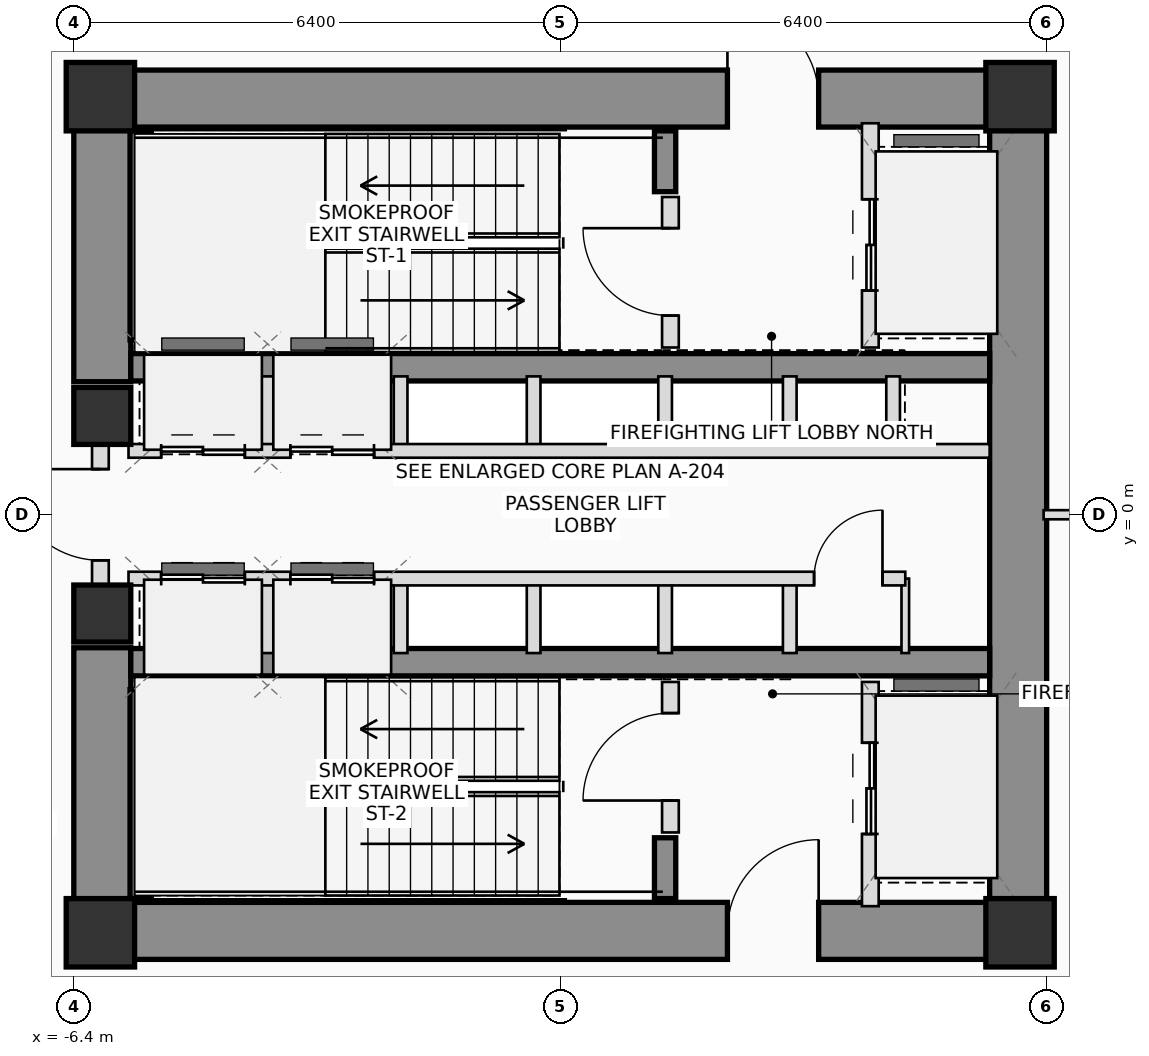
"""IFC4 building model, lengths in metres.
Left out: names, types, materials, properties, quantities, classifications, styles, units other than length and angle.
Written with IfcOpenShell. Run it as: python <this file> out.ifc"""

import sys

from ifc_helpers import new_model, si_unit, direction, frame, frame_2d, origin, origin_2d, place, context, subcontext, project, spatial, rectangle, extrude, source, transform, mapped, element, fill, save


model = new_model("IFC4")
c1 = context("Model", 3, precision=1e-05, world=origin(), true_north=direction((0.0, 1.0)))
c2 = subcontext(c1, "Body", "Model", "MODEL_VIEW")
j1 = project(units=[si_unit("LENGTHUNIT", "METRE"), si_unit("PLANEANGLEUNIT", "RADIAN")], contexts=[c1])
p1 = place(None, origin())
s1 = spatial("IfcSite", under=j1, at=p1, CompositionType="ELEMENT")
p2 = place(p1, origin())
s2 = spatial("IfcBuilding", under=s1, at=p2, CompositionType="ELEMENT")
p3 = place(p2, frame((0.0, 0.0, 27.5)))
s3 = spatial("IfcBuildingStorey", under=s2, at=p3, CompositionType="ELEMENT", Elevation=27.5)
m1 = source(origin(), c2, "Body", "SweptSolid", [
    extrude(rectangle(XDim=0.9, YDim=0.9, at=origin_2d()), origin(), (0.0, 0.0, 1.0), 3.7),
])
for number, where, z_axis, x_axis in (
    (1, (-6.05, -5.5, 0.0), (0.0, 0.0, 1.0), (1.0, 0.0, 0.0)),
    (2, (6.05, -5.5, 0.0), (0.0, 0.0, 1.0), (1.0, 0.0, 0.0)),
    (3, (6.05, 5.5, 0.0), (0.0, 0.0, 1.0), (1.0, 0.0, 0.0)),
    (4, (-6.05, 5.5, 0.0), (0.0, 0.0, 1.0), (1.0, 0.0, 0.0)),
):
    element("IfcColumn", number, at=place(p3, frame(where, z_axis=z_axis, x_axis=x_axis)), inside=s3, PredefinedType="COLUMN", context=c2, shape_type="MappedRepresentation", body=[
        mapped(m1, transform((0.0, 0.0, 0.0), scale=1.0)),
    ])
p4 = place(p3, frame((-6.4, 5.475, 0.0), z_axis=(0.0, 0.0, 1.0), x_axis=(1.0, 0.0, 0.0)))
e5 = element("IfcWall", 5, at=p4, inside=s3, PredefinedType="SHEAR", context=c2, shape_type="SweptSolid", body=[
    extrude(rectangle(XDim=12.8, YDim=0.75, at=frame_2d((6.4, 0.0))), origin(), (0.0, 0.0, 1.0), 3.7),
])
p5 = place(p4, frame((8.6, 0.0, 0.0)))
e6 = element("IfcOpeningElement", 6, at=p5, cuts=e5, PredefinedType="OPENING", context=c2, shape_type="SweptSolid", body=[
    extrude(rectangle(XDim=1.2, YDim=2.2, at=frame_2d((0.6, 1.1))), frame((0.0, 0.385, 0.0), z_axis=(0.0, -1.0, 0.0), x_axis=(1.0, 0.0, 0.0)), (0.0, 0.0, 1.0), 0.77),
])
p6 = place(p3, frame((-6.4, -5.475, 0.0), z_axis=(0.0, 0.0, 1.0), x_axis=(1.0, 0.0, 0.0)))
e7 = element("IfcWall", 7, at=p6, inside=s3, PredefinedType="SHEAR", context=c2, shape_type="SweptSolid", body=[
    extrude(rectangle(XDim=12.8, YDim=0.75, at=frame_2d((6.4, 0.0))), origin(), (0.0, 0.0, 1.0), 3.7),
])
p7 = place(p6, frame((8.6, 0.0, 0.0)))
e8 = element("IfcOpeningElement", 8, at=p7, cuts=e7, PredefinedType="OPENING", context=c2, shape_type="SweptSolid", body=[
    extrude(rectangle(XDim=1.2, YDim=2.2, at=frame_2d((0.6, 1.1))), frame((0.0, 0.385, 0.0), z_axis=(0.0, -1.0, 0.0), x_axis=(1.0, 0.0, 0.0)), (0.0, 0.0, 1.0), 0.77),
])
p8 = place(p3, frame((6.025, -5.1, 0.0), z_axis=(0.0, 0.0, 1.0), x_axis=(0.0, 1.0, 0.0)))
e9 = element("IfcWall", 9, at=p8, inside=s3, PredefinedType="SHEAR", context=c2, shape_type="SweptSolid", body=[
    extrude(rectangle(XDim=10.2, YDim=0.75, at=frame_2d((5.1, 0.0))), origin(), (0.0, 0.0, 1.0), 3.7),
])
for number, where, z_axis, x_axis in (
    (10, (-6.025, -5.1, 0.0), (0.0, 0.0, 1.0), (0.0, 1.0, 0.0)),
    (11, (-6.025, 1.75, 0.0), (0.0, 0.0, 1.0), (0.0, 1.0, 0.0)),
):
    element("IfcWall", number, at=place(p3, frame(where, z_axis=z_axis, x_axis=x_axis)), inside=s3, PredefinedType="SHEAR", context=c2, shape_type="SweptSolid", body=[
        extrude(rectangle(XDim=3.35, YDim=0.75, at=frame_2d((1.675, 0.0))), origin(), (0.0, 0.0, 1.0), 3.7),
    ])
for number, where, z_axis, x_axis in (
    (12, (-5.65, 1.94, 0.0), (0.0, 0.0, 1.0), (1.0, 0.0, 0.0)),
    (13, (-5.65, -1.94, 0.0), (0.0, 0.0, 1.0), (1.0, 0.0, 0.0)),
):
    element("IfcWall", number, at=place(p3, frame(where, z_axis=z_axis, x_axis=x_axis)), inside=s3, PredefinedType="SHEAR", context=c2, shape_type="SweptSolid", body=[
        extrude(rectangle(XDim=11.3, YDim=0.36, at=frame_2d((5.65, 0.0))), origin(), (0.0, 0.0, 1.0), 3.7),
    ])
p9 = place(p3, frame((-5.52, 2.3, 0.0), z_axis=(0.0, 0.0, 1.0), x_axis=(0.0, 1.0, 0.0)))
e14 = element("IfcWall", 14, at=p9, inside=s3, PredefinedType="SHEAR", context=c2, shape_type="SweptSolid", body=[
    extrude(rectangle(XDim=2.75, YDim=0.28, at=frame_2d((1.375, 0.0))), origin(), (0.0, 0.0, 1.0), 3.7),
])
p10 = place(p3, frame((1.38, 4.25, 0.0), z_axis=(0.0, 0.0, 1.0), x_axis=(0.0, 1.0, 0.0)))
e15 = element("IfcWall", 15, at=p10, inside=s3, PredefinedType="SHEAR", context=c2, shape_type="SweptSolid", body=[
    extrude(rectangle(XDim=0.8, YDim=0.28, at=frame_2d((0.4, 0.0))), origin(), (0.0, 0.0, 1.0), 3.7),
])
p11 = place(p3, frame((-5.52, -5.05, 0.0), z_axis=(0.0, 0.0, 1.0), x_axis=(0.0, 1.0, 0.0)))
e16 = element("IfcWall", 16, at=p11, inside=s3, PredefinedType="SHEAR", context=c2, shape_type="SweptSolid", body=[
    extrude(rectangle(XDim=2.75, YDim=0.28, at=frame_2d((1.375, 0.0))), origin(), (0.0, 0.0, 1.0), 3.7),
])
p12 = place(p3, frame((1.38, -5.05, 0.0), z_axis=(0.0, 0.0, 1.0), x_axis=(0.0, 1.0, 0.0)))
e17 = element("IfcWall", 17, at=p12, inside=s3, PredefinedType="SHEAR", context=c2, shape_type="SweptSolid", body=[
    extrude(rectangle(XDim=0.8, YDim=0.28, at=frame_2d((0.4, 0.0))), origin(), (0.0, 0.0, 1.0), 3.7),
])
m2 = source(origin(), c2, "Body", "SweptSolid", [
    extrude(rectangle(XDim=0.75, YDim=0.75, at=origin_2d()), origin(), (0.0, 0.0, 1.0), 3.7),
])
for number, where, z_axis, x_axis in (
    (18, (-6.025, -1.3, 0.0), (0.0, 0.0, 1.0), (1.0, 0.0, 0.0)),
    (19, (-6.025, 1.3, 0.0), (0.0, 0.0, 1.0), (1.0, 0.0, 0.0)),
):
    element("IfcColumn", number, at=place(p3, frame(where, z_axis=z_axis, x_axis=x_axis)), inside=s3, PredefinedType="COLUMN", context=c2, shape_type="MappedRepresentation", body=[
        mapped(m2, transform((0.0, 0.0, 0.0), scale=1.0)),
    ])
p13 = place(p3, frame((-6.05, -0.95, 0.0), z_axis=(0.0, 0.0, 1.0), x_axis=(0.0, 1.0, 0.0)))
e20 = element("IfcWall", 20, at=p13, inside=s3, PredefinedType="PLUMBINGWALL", context=c2, shape_type="SweptSolid", body=[
    extrude(rectangle(XDim=1.9, YDim=0.22, at=frame_2d((0.95, 0.0))), origin(), (0.0, 0.0, 1.0), 2.475),
])
p14 = place(p13, frame((0.35, 0.0, 0.0)))
e21 = element("IfcOpeningElement", 21, at=p14, cuts=e20, PredefinedType="OPENING", context=c2, shape_type="SweptSolid", body=[
    extrude(rectangle(XDim=1.2, YDim=2.2, at=frame_2d((0.6, 1.1))), frame((0.0, 0.12, 0.0), z_axis=(0.0, -1.0, 0.0), x_axis=(1.0, 0.0, 0.0)), (0.0, 0.0, 1.0), 0.24),
])
p15 = place(p3, frame((1.45, 2.2, 0.0), z_axis=(0.0, 0.0, 1.0), x_axis=(0.0, 1.0, 0.0)))
e22 = element("IfcWall", 22, at=p15, inside=s3, PredefinedType="PLUMBINGWALL", context=c2, shape_type="SweptSolid", body=[
    extrude(rectangle(XDim=1.98, YDim=0.22, at=frame_2d((0.99, 0.0))), origin(), (0.0, 0.0, 1.0), 3.495),
])
p16 = place(p15, frame((0.42, 0.0, 0.0)))
e23 = element("IfcOpeningElement", 23, at=p16, cuts=e22, PredefinedType="OPENING", context=c2, shape_type="SweptSolid", body=[
    extrude(rectangle(XDim=1.15, YDim=2.15, at=frame_2d((0.575, 1.075))), frame((0.0, 0.12, 0.0), z_axis=(0.0, -1.0, 0.0), x_axis=(1.0, 0.0, 0.0)), (0.0, 0.0, 1.0), 0.24),
])
p17 = place(p3, frame((4.08, 2.2, 0.0), z_axis=(0.0, 0.0, 1.0), x_axis=(0.0, 1.0, 0.0)))
e24 = element("IfcWall", 24, at=p17, inside=s3, PredefinedType="PLUMBINGWALL", context=c2, shape_type="SweptSolid", body=[
    extrude(rectangle(XDim=2.95, YDim=0.22, at=frame_2d((1.475, 0.0))), origin(), (0.0, 0.0, 1.0), 3.495),
])
p18 = place(p17, frame((0.75, 0.0, 0.0)))
e25 = element("IfcOpeningElement", 25, at=p18, cuts=e24, PredefinedType="OPENING", context=c2, shape_type="SweptSolid", body=[
    extrude(rectangle(XDim=1.2, YDim=2.25, at=frame_2d((0.6, 1.125))), frame((0.0, 0.12, 0.0), z_axis=(0.0, -1.0, 0.0), x_axis=(1.0, 0.0, 0.0)), (0.0, 0.0, 1.0), 0.24),
])
p19 = place(p3, frame((1.45, -4.18, 0.0), z_axis=(0.0, 0.0, 1.0), x_axis=(0.0, 1.0, 0.0)))
e26 = element("IfcWall", 26, at=p19, inside=s3, PredefinedType="PLUMBINGWALL", context=c2, shape_type="SweptSolid", body=[
    extrude(rectangle(XDim=1.98, YDim=0.22, at=frame_2d((0.99, 0.0))), origin(), (0.0, 0.0, 1.0), 3.495),
])
p20 = place(p19, frame((0.42, 0.0, 0.0)))
e27 = element("IfcOpeningElement", 27, at=p20, cuts=e26, PredefinedType="OPENING", context=c2, shape_type="SweptSolid", body=[
    extrude(rectangle(XDim=1.15, YDim=2.15, at=frame_2d((0.575, 1.075))), frame((0.0, 0.12, 0.0), z_axis=(0.0, -1.0, 0.0), x_axis=(1.0, 0.0, 0.0)), (0.0, 0.0, 1.0), 0.24),
])
p21 = place(p3, frame((4.08, -5.15, 0.0), z_axis=(0.0, 0.0, 1.0), x_axis=(0.0, 1.0, 0.0)))
e28 = element("IfcWall", 28, at=p21, inside=s3, PredefinedType="PLUMBINGWALL", context=c2, shape_type="SweptSolid", body=[
    extrude(rectangle(XDim=2.95, YDim=0.22, at=frame_2d((1.475, 0.0))), origin(), (0.0, 0.0, 1.0), 3.495),
])
p22 = place(p21, frame((0.95, 0.0, 0.0)))
e29 = element("IfcOpeningElement", 29, at=p22, cuts=e28, PredefinedType="OPENING", context=c2, shape_type="SweptSolid", body=[
    extrude(rectangle(XDim=1.2, YDim=2.25, at=frame_2d((0.6, 1.125))), frame((0.0, 0.12, 0.0), z_axis=(0.0, -1.0, 0.0), x_axis=(1.0, 0.0, 0.0)), (0.0, 0.0, 1.0), 0.24),
])
for number, where, z_axis, x_axis in (
    (30, (-3.85, 0.84, 0.0), (0.0, 0.0, 1.0), (0.0, 1.0, 0.0)),
    (31, (-3.85, -1.82, 0.0), (0.0, 0.0, 1.0), (0.0, 1.0, 0.0)),
    (32, (-2.1, 0.84, 0.0), (0.0, 0.0, 1.0), (0.0, 1.0, 0.0)),
    (33, (-2.1, -1.82, 0.0), (0.0, 0.0, 1.0), (0.0, 1.0, 0.0)),
    (34, (-0.35, 0.84, 0.0), (0.0, 0.0, 1.0), (0.0, 1.0, 0.0)),
    (35, (-0.35, -1.82, 0.0), (0.0, 0.0, 1.0), (0.0, 1.0, 0.0)),
    (36, (1.38, 0.84, 0.0), (0.0, 0.0, 1.0), (0.0, 1.0, 0.0)),
    (37, (1.38, -1.82, 0.0), (0.0, 0.0, 1.0), (0.0, 1.0, 0.0)),
    (38, (3.02, 0.84, 0.0), (0.0, 0.0, 1.0), (0.0, 1.0, 0.0)),
    (39, (4.38, 0.84, 0.0), (0.0, 0.0, 1.0), (0.0, 1.0, 0.0)),
    (40, (3.02, -1.82, 0.0), (0.0, 0.0, 1.0), (0.0, 1.0, 0.0)),
):
    element("IfcWall", number, at=place(p3, frame(where, z_axis=z_axis, x_axis=x_axis)), inside=s3, PredefinedType="PLUMBINGWALL", context=c2, shape_type="SweptSolid", body=[
        extrude(rectangle(XDim=0.98, YDim=0.18, at=frame_2d((0.49, 0.0))), origin(), (0.0, 0.0, 1.0), 3.495),
    ])
p23 = place(p3, frame((4.54, -1.82, 0.0), z_axis=(0.0, 0.0, 1.0), x_axis=(0.0, 1.0, 0.0)))
e41 = element("IfcWall", 41, at=p23, inside=s3, PredefinedType="PARTITIONING", context=c2, shape_type="SweptSolid", body=[
    extrude(rectangle(XDim=0.98, YDim=0.1, at=frame_2d((0.49, 0.0))), origin(), (0.0, 0.0, 1.0), 3.495),
])
p24 = place(p3, frame((-5.68, 0.84, 0.0), z_axis=(0.0, 0.0, 1.0), x_axis=(1.0, 0.0, 0.0)))
e42 = element("IfcWall", 42, at=p24, inside=s3, PredefinedType="PLUMBINGWALL", context=c2, shape_type="SweptSolid", body=[
    extrude(rectangle(XDim=11.33, YDim=0.18, at=frame_2d((5.665, 0.0))), origin(), (0.0, 0.0, 1.0), 3.495),
])
p25 = place(p24, frame((0.43, 0.0, 0.0)))
e43 = element("IfcOpeningElement", 43, at=p25, cuts=e42, PredefinedType="OPENING", context=c2, shape_type="SweptSolid", body=[
    extrude(rectangle(XDim=1.1, YDim=2.2, at=frame_2d((0.55, 1.1))), frame((0.0, 0.1, 0.0), z_axis=(0.0, -1.0, 0.0), x_axis=(1.0, 0.0, 0.0)), (0.0, 0.0, 1.0), 0.2),
])
p26 = place(p24, frame((2.13, 0.0, 0.0)))
e44 = element("IfcOpeningElement", 44, at=p26, cuts=e42, PredefinedType="OPENING", context=c2, shape_type="SweptSolid", body=[
    extrude(rectangle(XDim=1.1, YDim=2.2, at=frame_2d((0.55, 1.1))), frame((0.0, 0.1, 0.0), z_axis=(0.0, -1.0, 0.0), x_axis=(1.0, 0.0, 0.0)), (0.0, 0.0, 1.0), 0.2),
])
p27 = place(p3, frame((-5.68, -0.84, 0.0), z_axis=(0.0, 0.0, 1.0), x_axis=(1.0, 0.0, 0.0)))
e45 = element("IfcWall", 45, at=p27, inside=s3, PredefinedType="PLUMBINGWALL", context=c2, shape_type="SweptSolid", body=[
    extrude(rectangle(XDim=10.22, YDim=0.18, at=frame_2d((5.11, 0.0))), origin(), (0.0, 0.0, 1.0), 3.495),
])
p28 = place(p27, frame((0.43, 0.0, 0.0)))
e46 = element("IfcOpeningElement", 46, at=p28, cuts=e45, PredefinedType="OPENING", context=c2, shape_type="SweptSolid", body=[
    extrude(rectangle(XDim=1.1, YDim=2.2, at=frame_2d((0.55, 1.1))), frame((0.0, 0.1, 0.0), z_axis=(0.0, -1.0, 0.0), x_axis=(1.0, 0.0, 0.0)), (0.0, 0.0, 1.0), 0.2),
])
p29 = place(p27, frame((2.13, 0.0, 0.0)))
e47 = element("IfcOpeningElement", 47, at=p29, cuts=e45, PredefinedType="OPENING", context=c2, shape_type="SweptSolid", body=[
    extrude(rectangle(XDim=1.1, YDim=2.2, at=frame_2d((0.55, 1.1))), frame((0.0, 0.1, 0.0), z_axis=(0.0, -1.0, 0.0), x_axis=(1.0, 0.0, 0.0)), (0.0, 0.0, 1.0), 0.2),
])
p30 = place(p27, frame((9.02, 0.0, 0.0)))
e48 = element("IfcOpeningElement", 48, at=p30, cuts=e45, PredefinedType="OPENING", context=c2, shape_type="SweptSolid", body=[
    extrude(rectangle(XDim=0.9, YDim=2.05, at=frame_2d((0.45, 1.025))), frame((0.0, 0.1, 0.0), z_axis=(0.0, -1.0, 0.0), x_axis=(1.0, 0.0, 0.0)), (0.0, 0.0, 1.0), 0.2),
])
p31 = place(p3, frame((6.36, 0.0, 0.0), z_axis=(0.0, 0.0, 1.0), x_axis=(1.0, 0.0, 0.0)))
e49 = element("IfcWall", 49, at=p31, inside=s3, PredefinedType="PARTITIONING", context=c2, shape_type="SweptSolid", body=[
    extrude(rectangle(XDim=19.191, YDim=0.12, at=frame_2d((9.595, 0.0))), origin(), (0.0, 0.0, 1.0), 2.96),
])
p32 = place(p5, origin())
e50 = element("IfcDoor", 50, at=p32, inside=s3, OperationType="SINGLE_SWING_LEFT", PredefinedType="DOOR", context=c2, shape_type="SweptSolid", body=[
    extrude(rectangle(XDim=1.2, YDim=2.2, at=frame_2d((0.6, 1.1))), frame((0.0, 0.025, 0.0), z_axis=(0.0, -1.0, 0.0), x_axis=(1.0, 0.0, 0.0)), (0.0, 0.0, 1.0), 0.05),
])
fill(e6, e50)
p33 = place(p7, origin())
e51 = element("IfcDoor", 51, at=p33, inside=s3, OperationType="SINGLE_SWING_RIGHT", PredefinedType="DOOR", context=c2, shape_type="SweptSolid", body=[
    extrude(rectangle(XDim=1.2, YDim=2.2, at=frame_2d((0.6, 1.1))), frame((0.0, 0.025, 0.0), z_axis=(0.0, -1.0, 0.0), x_axis=(1.0, 0.0, 0.0)), (0.0, 0.0, 1.0), 0.05),
])
fill(e8, e51)
p34 = place(p14, origin())
e52 = element("IfcDoor", 52, at=p34, inside=s3, OperationType="SINGLE_SWING_RIGHT", PredefinedType="DOOR", context=c2, shape_type="SweptSolid", body=[
    extrude(rectangle(XDim=1.2, YDim=2.2, at=frame_2d((0.6, 1.1))), frame((0.0, 0.025, 0.0), z_axis=(0.0, -1.0, 0.0), x_axis=(1.0, 0.0, 0.0)), (0.0, 0.0, 1.0), 0.05),
])
fill(e21, e52)
p35 = place(p16, origin())
e53 = element("IfcDoor", 53, at=p35, inside=s3, OperationType="SINGLE_SWING_RIGHT", PredefinedType="DOOR", context=c2, shape_type="SweptSolid", body=[
    extrude(rectangle(XDim=1.15, YDim=2.15, at=frame_2d((0.575, 1.075))), frame((0.0, 0.025, 0.0), z_axis=(0.0, -1.0, 0.0), x_axis=(1.0, 0.0, 0.0)), (0.0, 0.0, 1.0), 0.05),
])
fill(e23, e53)
p36 = place(p18, origin())
e54 = element("IfcDoor", 54, at=p36, inside=s3, OperationType="DOUBLE_DOOR_SLIDING", PredefinedType="DOOR", context=c2, shape_type="SweptSolid", body=[
    extrude(rectangle(XDim=1.2, YDim=2.25, at=frame_2d((0.6, 1.125))), frame((0.0, 0.025, 0.0), z_axis=(0.0, -1.0, 0.0), x_axis=(1.0, 0.0, 0.0)), (0.0, 0.0, 1.0), 0.05),
])
fill(e25, e54)
p37 = place(p20, origin())
e55 = element("IfcDoor", 55, at=p37, inside=s3, OperationType="SINGLE_SWING_LEFT", PredefinedType="DOOR", context=c2, shape_type="SweptSolid", body=[
    extrude(rectangle(XDim=1.15, YDim=2.15, at=frame_2d((0.575, 1.075))), frame((0.0, 0.025, 0.0), z_axis=(0.0, -1.0, 0.0), x_axis=(1.0, 0.0, 0.0)), (0.0, 0.0, 1.0), 0.05),
])
fill(e27, e55)
p38 = place(p22, origin())
e56 = element("IfcDoor", 56, at=p38, inside=s3, OperationType="DOUBLE_DOOR_SLIDING", PredefinedType="DOOR", context=c2, shape_type="SweptSolid", body=[
    extrude(rectangle(XDim=1.2, YDim=2.25, at=frame_2d((0.6, 1.125))), frame((0.0, 0.025, 0.0), z_axis=(0.0, -1.0, 0.0), x_axis=(1.0, 0.0, 0.0)), (0.0, 0.0, 1.0), 0.05),
])
fill(e29, e56)
p39 = place(p25, origin())
e57 = element("IfcDoor", 57, at=p39, inside=s3, OperationType="DOUBLE_DOOR_SLIDING", PredefinedType="DOOR", context=c2, shape_type="SweptSolid", body=[
    extrude(rectangle(XDim=1.1, YDim=2.2, at=frame_2d((0.55, 1.1))), frame((0.0, 0.025, 0.0), z_axis=(0.0, -1.0, 0.0), x_axis=(1.0, 0.0, 0.0)), (0.0, 0.0, 1.0), 0.05),
])
fill(e43, e57)
p40 = place(p26, origin())
e58 = element("IfcDoor", 58, at=p40, inside=s3, OperationType="DOUBLE_DOOR_SLIDING", PredefinedType="DOOR", context=c2, shape_type="SweptSolid", body=[
    extrude(rectangle(XDim=1.1, YDim=2.2, at=frame_2d((0.55, 1.1))), frame((0.0, 0.025, 0.0), z_axis=(0.0, -1.0, 0.0), x_axis=(1.0, 0.0, 0.0)), (0.0, 0.0, 1.0), 0.05),
])
fill(e44, e58)
p41 = place(p28, origin())
e59 = element("IfcDoor", 59, at=p41, inside=s3, OperationType="DOUBLE_DOOR_SLIDING", PredefinedType="DOOR", context=c2, shape_type="SweptSolid", body=[
    extrude(rectangle(XDim=1.1, YDim=2.2, at=frame_2d((0.55, 1.1))), frame((0.0, 0.025, 0.0), z_axis=(0.0, -1.0, 0.0), x_axis=(1.0, 0.0, 0.0)), (0.0, 0.0, 1.0), 0.05),
])
fill(e46, e59)
p42 = place(p29, origin())
e60 = element("IfcDoor", 60, at=p42, inside=s3, OperationType="DOUBLE_DOOR_SLIDING", PredefinedType="DOOR", context=c2, shape_type="SweptSolid", body=[
    extrude(rectangle(XDim=1.1, YDim=2.2, at=frame_2d((0.55, 1.1))), frame((0.0, 0.025, 0.0), z_axis=(0.0, -1.0, 0.0), x_axis=(1.0, 0.0, 0.0)), (0.0, 0.0, 1.0), 0.05),
])
fill(e47, e60)
p43 = place(p30, origin())
e61 = element("IfcDoor", 61, at=p43, inside=s3, OperationType="SINGLE_SWING_RIGHT", PredefinedType="DOOR", context=c2, shape_type="SweptSolid", body=[
    extrude(rectangle(XDim=0.9, YDim=2.05, at=frame_2d((0.45, 1.025))), frame((0.0, 0.025, 0.0), z_axis=(0.0, -1.0, 0.0), x_axis=(1.0, 0.0, 0.0)), (0.0, 0.0, 1.0), 0.05),
])
fill(e48, e61)
save(model, sys.argv[1])
